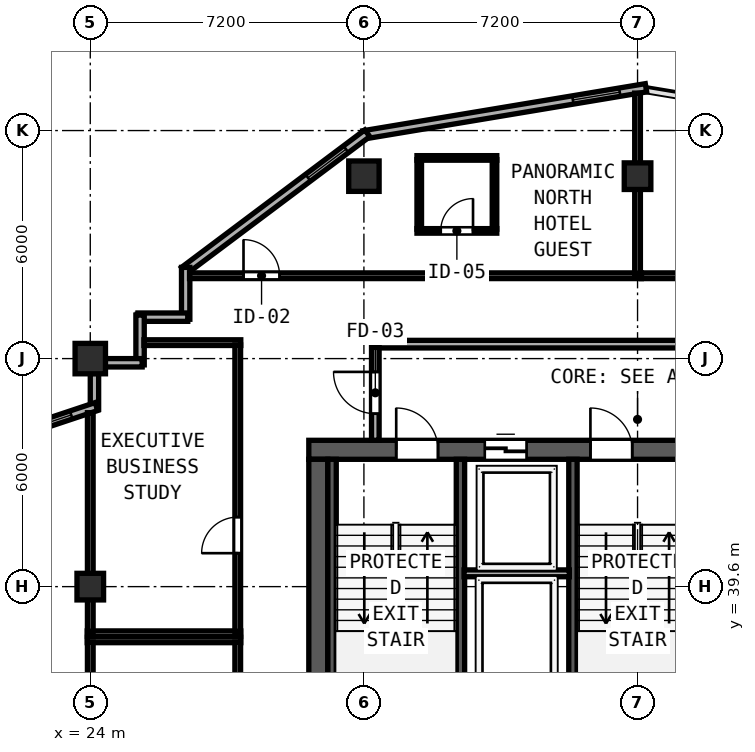
"""IFC4 building model, lengths in metres.
Left out: names, types, materials, properties, quantities, classifications, styles, units other than length and angle.
Written with IfcOpenShell. Run it as: python <this file> out.ifc"""

import sys

from ifc_helpers import new_model, si_unit, direction, frame, frame_2d, origin, origin_2d, place, context, subcontext, project, spatial, rectangle, hollow_rectangle, extrude, element, fill, save


model = new_model("IFC4")
c1 = context("Model", 3, precision=1e-05, world=origin(), true_north=direction((0.0, 1.0)))
c2 = subcontext(c1, "Body", "Model", "MODEL_VIEW")
j1 = project(units=[si_unit("LENGTHUNIT", "METRE"), si_unit("PLANEANGLEUNIT", "RADIAN")], contexts=[c1])
p1 = place(None, origin())
s1 = spatial("IfcSite", under=j1, at=p1, CompositionType="ELEMENT")
p2 = place(p1, origin())
s2 = spatial("IfcBuilding", under=s1, at=p2, CompositionType="ELEMENT")
p3 = place(p2, frame((0.0, 0.0, 269.85)))
s3 = spatial("IfcBuildingStorey", under=s2, at=p3, CompositionType="ELEMENT", Elevation=269.85)
p4 = place(p3, frame((29.75, 43.2, 0.0), z_axis=(0.0, 0.0, 1.0), x_axis=(1.0, 0.0, 0.0)))
e1 = element("IfcWall", 1, at=p4, inside=s3, PredefinedType="SHEAR", context=c2, shape_type="SweptSolid", body=[
    extrude(rectangle(XDim=17.3, YDim=0.5, at=frame_2d((8.65, 0.0))), origin(), (0.0, 0.0, 1.0), 3.67),
])
p5 = place(p4, frame((2.3, 0.0, 0.0)))
e2 = element("IfcOpeningElement", 2, at=p5, cuts=e1, PredefinedType="OPENING", context=c2, shape_type="SweptSolid", body=[
    extrude(rectangle(XDim=1.1, YDim=2.15, at=frame_2d((0.55, 1.075))), frame((0.0, 0.26, 0.0), z_axis=(0.0, -1.0, 0.0), x_axis=(1.0, 0.0, 0.0)), (0.0, 0.0, 1.0), 0.52),
])
p6 = place(p4, frame((7.41, 0.0, 0.0)))
e3 = element("IfcOpeningElement", 3, at=p6, cuts=e1, PredefinedType="OPENING", context=c2, shape_type="SweptSolid", body=[
    extrude(rectangle(XDim=1.1, YDim=2.15, at=frame_2d((0.55, 1.075))), frame((0.0, 0.26, 0.0), z_axis=(0.0, -1.0, 0.0), x_axis=(1.0, 0.0, 0.0)), (0.0, 0.0, 1.0), 0.52),
])
p7 = place(p4, frame((13.5, 0.0, 0.0)))
e4 = element("IfcOpeningElement", 4, at=p7, cuts=e1, PredefinedType="OPENING", context=c2, shape_type="SweptSolid", body=[
    extrude(rectangle(XDim=1.1, YDim=2.15, at=frame_2d((0.55, 1.075))), frame((0.0, 0.26, 0.0), z_axis=(0.0, -1.0, 0.0), x_axis=(1.0, 0.0, 0.0)), (0.0, 0.0, 1.0), 0.52),
])
p8 = place(p4, frame((4.63, 0.0, 0.0)))
e5 = element("IfcOpeningElement", 5, at=p8, cuts=e1, PredefinedType="OPENING", context=c2, shape_type="SweptSolid", body=[
    extrude(rectangle(XDim=1.1, YDim=2.2, at=frame_2d((0.55, 1.1))), frame((0.0, 0.26, 0.0), z_axis=(0.0, -1.0, 0.0), x_axis=(1.0, 0.0, 0.0)), (0.0, 0.0, 1.0), 0.52),
])
p9 = place(p4, frame((10.99, 0.0, 0.0)))
e6 = element("IfcOpeningElement", 6, at=p9, cuts=e1, PredefinedType="OPENING", context=c2, shape_type="SweptSolid", body=[
    extrude(rectangle(XDim=1.1, YDim=2.2, at=frame_2d((0.55, 1.1))), frame((0.0, 0.26, 0.0), z_axis=(0.0, -1.0, 0.0), x_axis=(1.0, 0.0, 0.0)), (0.0, 0.0, 1.0), 0.52),
])
p10 = place(p3, frame((30.0, 32.8, 0.0), z_axis=(0.0, 0.0, 1.0), x_axis=(0.0, 1.0, 0.0)))
e7 = element("IfcWall", 7, at=p10, inside=s3, PredefinedType="SHEAR", context=c2, shape_type="SweptSolid", body=[
    extrude(rectangle(XDim=10.15, YDim=0.5, at=frame_2d((5.075, 0.0))), origin(), (0.0, 0.0, 1.0), 3.67),
])
for number, where, z_axis, x_axis in (
    (8, (30.362, 35.39, 0.0), (0.0, 0.0, 1.0), (0.0, 1.0, 0.0)),
    (9, (33.74, 35.39, 0.0), (0.0, 0.0, 1.0), (0.0, 1.0, 0.0)),
    (10, (36.7, 35.39, 0.0), (0.0, 0.0, 1.0), (0.0, 1.0, 0.0)),
):
    element("IfcWall", number, at=place(p3, frame(where, z_axis=z_axis, x_axis=x_axis)), inside=s3, PredefinedType="SHEAR", context=c2, shape_type="SweptSolid", body=[
        extrude(rectangle(XDim=7.56, YDim=0.22, at=frame_2d((3.78, 0.0))), origin(), (0.0, 0.0, 1.0), 3.67),
    ])
for number, where, z_axis, x_axis in (
    (11, (24.0, 45.6, 0.0), (0.0, 0.0, 1.0), (1.0, 0.0, 0.0)),
    (12, (31.2, 50.4, 0.0), (0.0, 0.0, 1.0), (1.0, 0.0, 0.0)),
):
    element("IfcColumn", number, at=place(p3, frame(where, z_axis=z_axis, x_axis=x_axis)), inside=s3, PredefinedType="COLUMN", context=c2, shape_type="SweptSolid", body=[
        extrude(hollow_rectangle(XDim=0.8, YDim=0.8, WallThickness=0.03, at=origin_2d()), origin(), (0.0, 0.0, 1.0), 3.85),
    ])
for number, where, z_axis, x_axis in (
    (13, (24.0, 39.6, 0.0), (0.0, 0.0, 1.0), (1.0, 0.0, 0.0)),
    (14, (38.4, 50.4, 0.0), (0.0, 0.0, 1.0), (1.0, 0.0, 0.0)),
):
    element("IfcColumn", number, at=place(p3, frame(where, z_axis=z_axis, x_axis=x_axis)), inside=s3, PredefinedType="COLUMN", context=c2, shape_type="SweptSolid", body=[
        extrude(hollow_rectangle(XDim=0.7, YDim=0.7, WallThickness=0.026, at=origin_2d()), origin(), (0.0, 0.0, 1.0), 3.85),
    ])
p11 = place(p3, frame((38.622, 52.726, 0.0), z_axis=(0.0, 0.0, 1.0), x_axis=(-0.986390420428, -0.164420006349, 0.0)))
e15 = element("IfcWall", 15, at=p11, inside=s3, PredefinedType="SOLIDWALL", context=c2, shape_type="SweptSolid", body=[
    extrude(rectangle(XDim=7.534, YDim=0.22, at=frame_2d((3.767, 0.0))), origin(), (0.0, 0.0, 1.0), 3.67),
])
p12 = place(p11, frame((0.7, 0.0, 0.85)))
e16 = element("IfcOpeningElement", 16, at=p12, cuts=e15, PredefinedType="OPENING", context=c2, shape_type="SweptSolid", body=[
    extrude(rectangle(XDim=1.25, YDim=1.95, at=frame_2d((0.625, 0.975))), frame((0.0, 0.12, 0.0), z_axis=(0.0, -1.0, 0.0), x_axis=(1.0, 0.0, 0.0)), (0.0, 0.0, 1.0), 0.24),
])
p13 = place(p3, frame((31.289, 51.529, 0.0), z_axis=(0.0, 0.0, 1.0), x_axis=(-0.800014580093, -0.599980559383, 0.0)))
e17 = element("IfcWall", 17, at=p13, inside=s3, PredefinedType="SOLIDWALL", context=c2, shape_type="SweptSolid", body=[
    extrude(rectangle(XDim=6.028, YDim=0.22, at=frame_2d((3.014, 0.0))), origin(), (0.0, 0.0, 1.0), 3.67),
])
p14 = place(p13, frame((0.7, 0.0, 0.85)))
e18 = element("IfcOpeningElement", 18, at=p14, cuts=e17, PredefinedType="OPENING", context=c2, shape_type="SweptSolid", body=[
    extrude(rectangle(XDim=1.25, YDim=1.95, at=frame_2d((0.625, 0.975))), frame((0.0, 0.12, 0.0), z_axis=(0.0, -1.0, 0.0), x_axis=(1.0, 0.0, 0.0)), (0.0, 0.0, 1.0), 0.24),
])
p15 = place(p3, frame((26.51, 48.0, 0.0), z_axis=(0.0, 0.0, 1.0), x_axis=(0.0, -1.0, 0.0)))
e19 = element("IfcWall", 19, at=p15, inside=s3, PredefinedType="SOLIDWALL", context=c2, shape_type="SweptSolid", body=[
    extrude(rectangle(XDim=1.365, YDim=0.22, at=frame_2d((0.683, 0.0))), origin(), (0.0, 0.0, 1.0), 3.67),
])
for number, where, z_axis, x_axis in (
    (20, (26.565, 46.69, 0.0), (0.0, 0.0, 1.0), (-1.0, 0.0, 0.0)),
    (21, (25.31, 46.745, 0.0), (0.0, 0.0, 1.0), (0.0, -1.0, 0.0)),
):
    element("IfcWall", number, at=place(p3, frame(where, z_axis=z_axis, x_axis=x_axis)), inside=s3, PredefinedType="SOLIDWALL", context=c2, shape_type="SweptSolid", body=[
        extrude(rectangle(XDim=1.31, YDim=0.22, at=frame_2d((0.655, 0.0))), origin(), (0.0, 0.0, 1.0), 3.67),
    ])
p16 = place(p3, frame((25.365, 45.49, 0.0), z_axis=(0.0, 0.0, 1.0), x_axis=(-1.0, 0.0, 0.0)))
e22 = element("IfcWall", 22, at=p16, inside=s3, PredefinedType="SOLIDWALL", context=c2, shape_type="SweptSolid", body=[
    extrude(rectangle(XDim=0.973, YDim=0.22, at=frame_2d((0.486, 0.0))), origin(), (0.0, 0.0, 1.0), 3.67),
])
p17 = place(p3, frame((24.11, 45.208, 0.0), z_axis=(0.0, 0.0, 1.0), x_axis=(0.0, -1.0, 0.0)))
e23 = element("IfcWall", 23, at=p17, inside=s3, PredefinedType="SOLIDWALL", context=c2, shape_type="SweptSolid", body=[
    extrude(rectangle(XDim=0.942, YDim=0.22, at=frame_2d((0.471, 0.0))), origin(), (0.0, 0.0, 1.0), 3.315),
])
p18 = place(p3, frame((24.162, 44.338, 0.0), z_axis=(0.0, 0.0, 1.0), x_axis=(-0.948687165594, -0.31621616315, 0.0)))
e24 = element("IfcWall", 24, at=p18, inside=s3, PredefinedType="SOLIDWALL", context=c2, shape_type="SweptSolid", body=[
    extrude(rectangle(XDim=6.312, YDim=0.22, at=frame_2d((3.156, 0.0))), origin(), (0.0, 0.0, 1.0), 3.315),
])
p19 = place(p18, frame((0.7, 0.0, 0.85)))
e25 = element("IfcOpeningElement", 25, at=p19, cuts=e24, PredefinedType="OPENING", context=c2, shape_type="SweptSolid", body=[
    extrude(rectangle(XDim=1.25, YDim=1.95, at=frame_2d((0.625, 0.975))), frame((0.0, 0.12, 0.0), z_axis=(0.0, -1.0, 0.0), x_axis=(1.0, 0.0, 0.0)), (0.0, 0.0, 1.0), 0.24),
])
p20 = place(p3, frame((31.5, 45.98, 0.0), z_axis=(0.0, 0.0, 1.0), x_axis=(1.0, 0.0, 0.0)))
e26 = element("IfcWall", 26, at=p20, inside=s3, PredefinedType="SOLIDWALL", context=c2, shape_type="SweptSolid", body=[
    extrude(rectangle(XDim=13.8, YDim=0.2, at=frame_2d((6.9, 0.0))), origin(), (0.0, 0.0, 1.0), 3.67),
])
p21 = place(p3, frame((31.5, 43.45, 0.0), z_axis=(0.0, 0.0, 1.0), x_axis=(0.0, 1.0, 0.0)))
e27 = element("IfcWall", 27, at=p21, inside=s3, PredefinedType="SOLIDWALL", context=c2, shape_type="SweptSolid", body=[
    extrude(rectangle(XDim=2.445, YDim=0.2, at=frame_2d((1.223, 0.0))), origin(), (0.0, 0.0, 1.0), 3.67),
])
p22 = place(p21, frame((1.8, 0.0, 0.0), z_axis=(0.0, 0.0, 1.0), x_axis=(-1.0, 0.0, 0.0)))
e28 = element("IfcOpeningElement", 28, at=p22, cuts=e27, PredefinedType="OPENING", context=c2, shape_type="SweptSolid", body=[
    extrude(rectangle(XDim=1.1, YDim=2.15, at=frame_2d((0.55, 1.075))), frame((0.0, 0.11, 0.0), z_axis=(0.0, -1.0, 0.0), x_axis=(1.0, 0.0, 0.0)), (0.0, 0.0, 1.0), 0.22),
])
p23 = place(p3, frame((33.835, 39.95, 0.0), z_axis=(0.0, 0.0, 1.0), x_axis=(1.0, 0.0, 0.0)))
e29 = element("IfcWall", 29, at=p23, inside=s3, PredefinedType="SOLIDWALL", context=c2, shape_type="SweptSolid", body=[
    extrude(rectangle(XDim=2.77, YDim=0.18, at=frame_2d((1.385, 0.0))), origin(), (0.0, 0.0, 1.0), 3.67),
])
p24 = place(p3, frame((23.92, 38.2, 0.0), z_axis=(0.0, 0.0, 1.0), x_axis=(1.0, 0.0, 0.0)))
e30 = element("IfcWall", 30, at=p24, inside=s3, PredefinedType="PARTITIONING", context=c2, shape_type="SweptSolid", body=[
    extrude(rectangle(XDim=4.04, YDim=0.15, at=frame_2d((2.02, 0.0))), origin(), (0.0, 0.0, 1.0), 3.67),
])
p25 = place(p3, frame((24.0, 33.06, 0.0), z_axis=(0.0, 0.0, 1.0), x_axis=(0.0, 1.0, 0.0)))
e31 = element("IfcWall", 31, at=p25, inside=s3, PredefinedType="PARTITIONING", context=c2, shape_type="SweptSolid", body=[
    extrude(rectangle(XDim=5.08, YDim=0.15, at=frame_2d((2.54, 0.0))), origin(), (0.0, 0.0, 1.0), 3.315),
])
p26 = place(p3, frame((27.88, 33.06, 0.0), z_axis=(0.0, 0.0, 1.0), x_axis=(0.0, 1.0, 0.0)))
e32 = element("IfcWall", 32, at=p26, inside=s3, PredefinedType="PARTITIONING", context=c2, shape_type="SweptSolid", body=[
    extrude(rectangle(XDim=5.08, YDim=0.15, at=frame_2d((2.54, 0.0))), origin(), (0.0, 0.0, 1.0), 3.67),
])
p27 = place(p26, frame((2.41, 0.0, 0.0), z_axis=(0.0, 0.0, 1.0), x_axis=(-1.0, 0.0, 0.0)))
e33 = element("IfcOpeningElement", 33, at=p27, cuts=e32, PredefinedType="OPENING", context=c2, shape_type="SweptSolid", body=[
    extrude(rectangle(XDim=0.95, YDim=2.12, at=frame_2d((0.475, 1.06))), frame((0.0, 0.085, 0.0), z_axis=(0.0, -1.0, 0.0), x_axis=(1.0, 0.0, 0.0)), (0.0, 0.0, 1.0), 0.17),
])
p28 = place(p3, frame((25.412, 46.02, 0.0), z_axis=(0.0, 0.0, 1.0), x_axis=(1.0, 0.0, 0.0)))
e34 = element("IfcWall", 34, at=p28, inside=s3, PredefinedType="PARTITIONING", context=c2, shape_type="SweptSolid", body=[
    extrude(rectangle(XDim=2.548, YDim=0.15, at=frame_2d((1.274, 0.0))), origin(), (0.0, 0.0, 1.0), 3.67),
])
p29 = place(p3, frame((23.92, 38.36, 0.0), z_axis=(0.0, 0.0, 1.0), x_axis=(1.0, 0.0, 0.0)))
e35 = element("IfcWall", 35, at=p29, inside=s3, PredefinedType="PARTITIONING", context=c2, shape_type="SweptSolid", body=[
    extrude(rectangle(XDim=4.04, YDim=0.15, at=frame_2d((2.02, 0.0))), origin(), (0.0, 0.0, 1.0), 3.67),
])
p30 = place(p3, frame((24.0, 38.42, 0.0), z_axis=(0.0, 0.0, 1.0), x_axis=(0.0, 1.0, 0.0)))
e36 = element("IfcWall", 36, at=p30, inside=s3, PredefinedType="PARTITIONING", context=c2, shape_type="SweptSolid", body=[
    extrude(rectangle(XDim=5.757, YDim=0.15, at=frame_2d((2.878, 0.0))), origin(), (0.0, 0.0, 1.0), 3.315),
])
p31 = place(p3, frame((27.88, 38.42, 0.0), z_axis=(0.0, 0.0, 1.0), x_axis=(0.0, 1.0, 0.0)))
e37 = element("IfcWall", 37, at=p31, inside=s3, PredefinedType="PARTITIONING", context=c2, shape_type="SweptSolid", body=[
    extrude(rectangle(XDim=7.54, YDim=0.15, at=frame_2d((3.77, 0.0))), origin(), (0.0, 0.0, 1.0), 3.67),
])
p32 = place(p31, frame((3.01, 0.0, 0.0), z_axis=(0.0, 0.0, 1.0), x_axis=(-1.0, 0.0, 0.0)))
e38 = element("IfcOpeningElement", 38, at=p32, cuts=e37, PredefinedType="OPENING", context=c2, shape_type="SweptSolid", body=[
    extrude(rectangle(XDim=0.95, YDim=2.12, at=frame_2d((0.475, 1.06))), frame((0.0, 0.085, 0.0), z_axis=(0.0, -1.0, 0.0), x_axis=(1.0, 0.0, 0.0)), (0.0, 0.0, 1.0), 0.17),
])
p33 = place(p3, frame((26.612, 47.78, 0.0), z_axis=(0.0, 0.0, 1.0), x_axis=(1.0, 0.0, 0.0)))
e39 = element("IfcWall", 39, at=p33, inside=s3, PredefinedType="PARTITIONING", context=c2, shape_type="SweptSolid", body=[
    extrude(rectangle(XDim=11.888, YDim=0.15, at=frame_2d((5.944, 0.0))), origin(), (0.0, 0.0, 1.0), 3.67),
])
p34 = place(p33, frame((1.42, 0.0, 0.0)))
e40 = element("IfcOpeningElement", 40, at=p34, cuts=e39, PredefinedType="OPENING", context=c2, shape_type="SweptSolid", body=[
    extrude(rectangle(XDim=0.95, YDim=2.15, at=frame_2d((0.475, 1.075))), frame((0.0, 0.085, 0.0), z_axis=(0.0, -1.0, 0.0), x_axis=(1.0, 0.0, 0.0)), (0.0, 0.0, 1.0), 0.17),
])
p35 = place(p3, frame((38.4, 47.84, 0.0), z_axis=(0.0, 0.0, 1.0), x_axis=(0.0, 1.0, 0.0)))
e41 = element("IfcWall", 41, at=p35, inside=s3, PredefinedType="PARTITIONING", context=c2, shape_type="SweptSolid", body=[
    extrude(rectangle(XDim=4.745, YDim=0.15, at=frame_2d((2.373, 0.0))), origin(), (0.0, 0.0, 1.0), 3.67),
])
p36 = place(p3, frame((32.596, 50.88, 0.0), z_axis=(0.0, 0.0, 1.0), x_axis=(1.0, 0.0, 0.0)))
e42 = element("IfcWall", 42, at=p36, inside=s3, PredefinedType="PARTITIONING", context=c2, shape_type="SweptSolid", body=[
    extrude(rectangle(XDim=2.1, YDim=0.12, at=frame_2d((1.05, 0.0))), origin(), (0.0, 0.0, 1.0), 3.67),
])
p37 = place(p3, frame((32.596, 48.96, 0.0), z_axis=(0.0, 0.0, 1.0), x_axis=(1.0, 0.0, 0.0)))
e43 = element("IfcWall", 43, at=p37, inside=s3, PredefinedType="PARTITIONING", context=c2, shape_type="SweptSolid", body=[
    extrude(rectangle(XDim=2.1, YDim=0.12, at=frame_2d((1.05, 0.0))), origin(), (0.0, 0.0, 1.0), 3.67),
])
p38 = place(p37, frame((0.625, 0.0, 0.0)))
e44 = element("IfcOpeningElement", 44, at=p38, cuts=e43, PredefinedType="OPENING", context=c2, shape_type="SweptSolid", body=[
    extrude(rectangle(XDim=0.85, YDim=2.1, at=frame_2d((0.425, 1.05))), frame((0.0, 0.07, 0.0), z_axis=(0.0, -1.0, 0.0), x_axis=(1.0, 0.0, 0.0)), (0.0, 0.0, 1.0), 0.14),
])
for number, where, z_axis, x_axis in (
    (45, (32.656, 49.005, 0.0), (0.0, 0.0, 1.0), (0.0, 1.0, 0.0)),
    (46, (34.636, 49.005, 0.0), (0.0, 0.0, 1.0), (0.0, 1.0, 0.0)),
):
    element("IfcWall", number, at=place(p3, frame(where, z_axis=z_axis, x_axis=x_axis)), inside=s3, PredefinedType="PARTITIONING", context=c2, shape_type="SweptSolid", body=[
        extrude(rectangle(XDim=1.83, YDim=0.12, at=frame_2d((0.915, 0.0))), origin(), (0.0, 0.0, 1.0), 3.67),
    ])
p39 = place(p3, frame((38.502, 47.78, 0.0), z_axis=(0.0, 0.0, 1.0), x_axis=(1.0, 0.0, 0.0)))
e47 = element("IfcWall", 47, at=p39, inside=s3, PredefinedType="PARTITIONING", context=c2, shape_type="SweptSolid", body=[
    extrude(rectangle(XDim=7.198, YDim=0.15, at=frame_2d((3.599, 0.0))), origin(), (0.0, 0.0, 1.0), 3.67),
])
p40 = place(p39, frame((1.417, 0.0, 0.0)))
e48 = element("IfcOpeningElement", 48, at=p40, cuts=e47, PredefinedType="OPENING", context=c2, shape_type="SweptSolid", body=[
    extrude(rectangle(XDim=0.95, YDim=2.15, at=frame_2d((0.475, 1.075))), frame((0.0, 0.085, 0.0), z_axis=(0.0, -1.0, 0.0), x_axis=(1.0, 0.0, 0.0)), (0.0, 0.0, 1.0), 0.17),
])
p41 = place(p12, origin())
e49 = element("IfcWindow", 49, at=p41, inside=s3, PartitioningType="SINGLE_PANEL", PredefinedType="WINDOW", context=c2, shape_type="SweptSolid", body=[
    extrude(rectangle(XDim=1.25, YDim=1.95, at=frame_2d((0.625, 0.975))), frame((0.0, 0.03, 0.0), z_axis=(0.0, -1.0, 0.0), x_axis=(1.0, 0.0, 0.0)), (0.0, 0.0, 1.0), 0.06),
])
fill(e16, e49)
p42 = place(p14, origin())
e50 = element("IfcWindow", 50, at=p42, inside=s3, PartitioningType="SINGLE_PANEL", PredefinedType="WINDOW", context=c2, shape_type="SweptSolid", body=[
    extrude(rectangle(XDim=1.25, YDim=1.95, at=frame_2d((0.625, 0.975))), frame((0.0, 0.03, 0.0), z_axis=(0.0, -1.0, 0.0), x_axis=(1.0, 0.0, 0.0)), (0.0, 0.0, 1.0), 0.06),
])
fill(e18, e50)
p43 = place(p19, origin())
e51 = element("IfcWindow", 51, at=p43, inside=s3, PartitioningType="SINGLE_PANEL", PredefinedType="WINDOW", context=c2, shape_type="SweptSolid", body=[
    extrude(rectangle(XDim=1.25, YDim=1.95, at=frame_2d((0.625, 0.975))), frame((0.0, 0.03, 0.0), z_axis=(0.0, -1.0, 0.0), x_axis=(1.0, 0.0, 0.0)), (0.0, 0.0, 1.0), 0.06),
])
fill(e25, e51)
p44 = place(p5, origin())
e52 = element("IfcDoor", 52, at=p44, inside=s3, OperationType="SINGLE_SWING_LEFT", PredefinedType="DOOR", context=c2, shape_type="SweptSolid", body=[
    extrude(rectangle(XDim=1.1, YDim=2.15, at=frame_2d((0.55, 1.075))), frame((0.0, 0.185, 0.0), z_axis=(0.0, -1.0, 0.0), x_axis=(1.0, 0.0, 0.0)), (0.0, 0.0, 1.0), 0.05),
])
fill(e2, e52)
p45 = place(p6, origin())
e53 = element("IfcDoor", 53, at=p45, inside=s3, OperationType="SINGLE_SWING_LEFT", PredefinedType="DOOR", context=c2, shape_type="SweptSolid", body=[
    extrude(rectangle(XDim=1.1, YDim=2.15, at=frame_2d((0.55, 1.075))), frame((0.0, 0.185, 0.0), z_axis=(0.0, -1.0, 0.0), x_axis=(1.0, 0.0, 0.0)), (0.0, 0.0, 1.0), 0.05),
])
fill(e3, e53)
p46 = place(p22, origin())
e54 = element("IfcDoor", 54, at=p46, inside=s3, OperationType="SINGLE_SWING_LEFT", PredefinedType="DOOR", context=c2, shape_type="SweptSolid", body=[
    extrude(rectangle(XDim=1.1, YDim=2.15, at=frame_2d((0.55, 1.075))), frame((0.0, 0.025, 0.0), z_axis=(0.0, -1.0, 0.0), x_axis=(1.0, 0.0, 0.0)), (0.0, 0.0, 1.0), 0.05),
])
fill(e28, e54)
p47 = place(p8, origin())
e55 = element("IfcDoor", 55, at=p47, inside=s3, OperationType="SLIDING_TO_LEFT", PredefinedType="DOOR", context=c2, shape_type="SweptSolid", body=[
    extrude(rectangle(XDim=1.1, YDim=2.2, at=frame_2d((0.55, 1.1))), frame((0.0, 0.185, 0.0), z_axis=(0.0, -1.0, 0.0), x_axis=(1.0, 0.0, 0.0)), (0.0, 0.0, 1.0), 0.05),
])
fill(e5, e55)
p48 = place(p32, origin())
e56 = element("IfcDoor", 56, at=p48, inside=s3, OperationType="SINGLE_SWING_RIGHT", PredefinedType="DOOR", context=c2, shape_type="SweptSolid", body=[
    extrude(rectangle(XDim=0.95, YDim=2.12, at=frame_2d((0.475, 1.06))), frame((0.0, 0.025, 0.0), z_axis=(0.0, -1.0, 0.0), x_axis=(1.0, 0.0, 0.0)), (0.0, 0.0, 1.0), 0.05),
])
fill(e38, e56)
p49 = place(p34, origin())
e57 = element("IfcDoor", 57, at=p49, inside=s3, OperationType="SINGLE_SWING_LEFT", PredefinedType="DOOR", context=c2, shape_type="SweptSolid", body=[
    extrude(rectangle(XDim=0.95, YDim=2.15, at=frame_2d((0.475, 1.075))), frame((0.0, 0.025, 0.0), z_axis=(0.0, -1.0, 0.0), x_axis=(1.0, 0.0, 0.0)), (0.0, 0.0, 1.0), 0.05),
])
fill(e40, e57)
p50 = place(p38, origin())
e58 = element("IfcDoor", 58, at=p50, inside=s3, OperationType="SINGLE_SWING_RIGHT", PredefinedType="DOOR", context=c2, shape_type="SweptSolid", body=[
    extrude(rectangle(XDim=0.85, YDim=2.1, at=frame_2d((0.425, 1.05))), frame((0.0, 0.025, 0.0), z_axis=(0.0, -1.0, 0.0), x_axis=(1.0, 0.0, 0.0)), (0.0, 0.0, 1.0), 0.05),
])
fill(e44, e58)
save(model, sys.argv[1])
